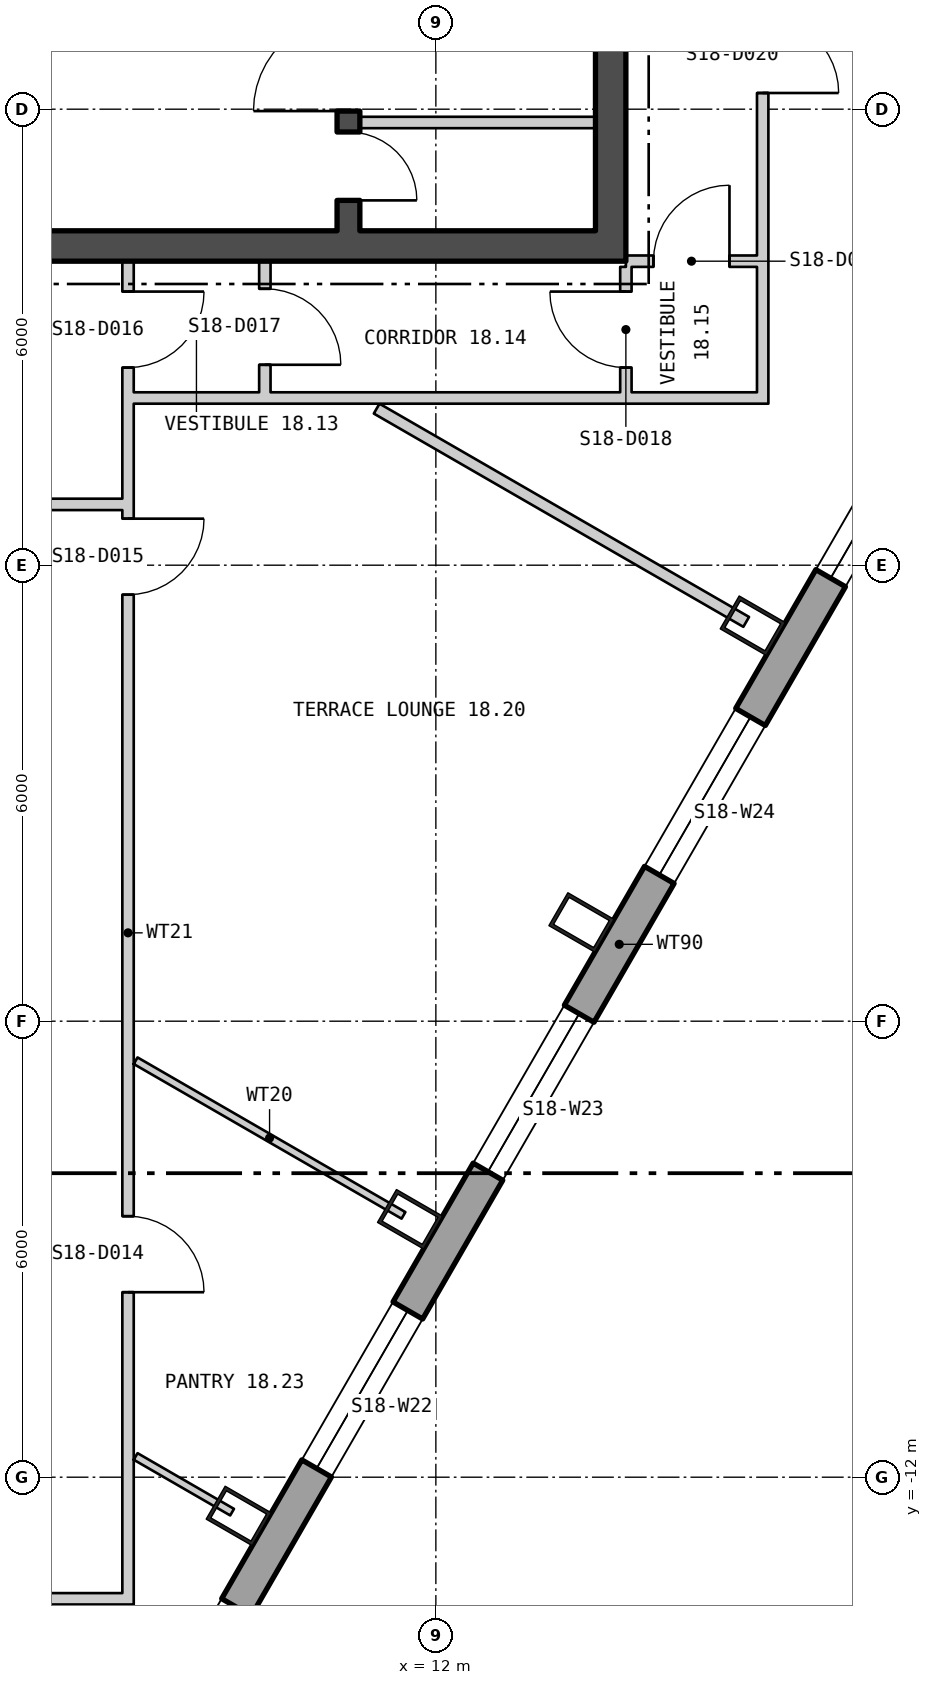
"""IFC4 building model, lengths in metres.
Left out: names, types, materials, properties, quantities, classifications, styles, units other than length and angle.
Written with IfcOpenShell. Run it as: python <this file> out.ifc"""

import sys

from ifc_helpers import new_model, si_unit, direction, frame, frame_2d, origin, origin_2d, place, context, subcontext, project, spatial, polyline, rectangle, hollow_rectangle, outline, extrude, element, fill, save


model = new_model("IFC4")
c1 = context("Model", 3, precision=1e-05, world=origin(), true_north=direction((0.0, 1.0)))
c2 = subcontext(c1, "Body", "Model", "MODEL_VIEW")
j1 = project(units=[si_unit("LENGTHUNIT", "METRE"), si_unit("PLANEANGLEUNIT", "RADIAN")], contexts=[c1])
p1 = place(None, origin())
s1 = spatial("IfcSite", under=j1, at=p1, CompositionType="ELEMENT")
p2 = place(p1, origin())
s2 = spatial("IfcBuilding", under=s1, at=p2, CompositionType="ELEMENT")
p3 = place(p2, frame((0.0, 0.0, 245.4)))
s3 = spatial("IfcBuildingStorey", under=s2, at=p3, CompositionType="ELEMENT", Elevation=245.4)
for number, where, z_axis, x_axis in (
    (1, (9.406, -12.51, 0.0), (0.0, 0.0, 1.0), (0.5, 0.866, 0.0)),
    (2, (11.66, -8.606, 0.0), (0.0, 0.0, 1.0), (0.5, 0.866, 0.0)),
    (3, (13.915, -4.701, 0.0), (0.0, 0.0, 1.0), (0.5, 0.866, 0.0)),
    (4, (16.169, -0.796, 0.0), (0.0, 0.0, 1.0), (0.5, 0.866, 0.0)),
):
    element("IfcColumn", number, at=place(p3, frame(where, z_axis=z_axis, x_axis=x_axis)), inside=s3, PredefinedType="COLUMN", context=c2, shape_type="SweptSolid", body=[
        extrude(hollow_rectangle(XDim=0.5, YDim=0.7, WallThickness=0.045, at=origin_2d()), origin(), (0.0, 0.0, 1.0), 3.9),
    ])
p4 = place(p3, frame((2.975, -24.799, -0.18), z_axis=(0.0, 0.0, 1.0), x_axis=(0.500000335318, 0.866025210188, 0.0)))
e5 = element("IfcWall", 5, at=p4, inside=s3, PredefinedType="SOLIDWALL", context=c2, shape_type="SweptSolid", body=[
    extrude(outline(polyline([(-0.13, -0.225), (45.88, -0.225), (45.62, 0.225), (0.13, 0.225), (-0.13, -0.225)])), origin(), (0.0, 0.0, 1.0), 3.68),
])
p5 = place(p4, frame((1.425, 0.0, 1.08)))
e6 = element("IfcOpeningElement", 6, at=p5, cuts=e5, PredefinedType="OPENING", context=c2, shape_type="SweptSolid", body=[
    extrude(rectangle(XDim=2.4, YDim=2.0, at=frame_2d((1.2, 1.0))), frame((0.0, 0.235, 0.0), z_axis=(0.0, -1.0, 0.0), x_axis=(1.0, 0.0, 0.0)), (0.0, 0.0, 1.0), 0.47),
])
p6 = place(p4, frame((5.895, 0.0, 1.08)))
e7 = element("IfcOpeningElement", 7, at=p6, cuts=e5, PredefinedType="OPENING", context=c2, shape_type="SweptSolid", body=[
    extrude(rectangle(XDim=2.4, YDim=2.0, at=frame_2d((1.2, 1.0))), frame((0.0, 0.235, 0.0), z_axis=(0.0, -1.0, 0.0), x_axis=(1.0, 0.0, 0.0)), (0.0, 0.0, 1.0), 0.47),
])
p7 = place(p4, frame((10.403, 0.0, 1.08)))
e8 = element("IfcOpeningElement", 8, at=p7, cuts=e5, PredefinedType="OPENING", context=c2, shape_type="SweptSolid", body=[
    extrude(rectangle(XDim=2.4, YDim=2.0, at=frame_2d((1.2, 1.0))), frame((0.0, 0.235, 0.0), z_axis=(0.0, -1.0, 0.0), x_axis=(1.0, 0.0, 0.0)), (0.0, 0.0, 1.0), 0.47),
])
p8 = place(p4, frame((14.912, 0.0, 1.08)))
e9 = element("IfcOpeningElement", 9, at=p8, cuts=e5, PredefinedType="OPENING", context=c2, shape_type="SweptSolid", body=[
    extrude(rectangle(XDim=2.4, YDim=2.0, at=frame_2d((1.2, 1.0))), frame((0.0, 0.235, 0.0), z_axis=(0.0, -1.0, 0.0), x_axis=(1.0, 0.0, 0.0)), (0.0, 0.0, 1.0), 0.47),
])
p9 = place(p4, frame((19.421, 0.0, 1.08)))
e10 = element("IfcOpeningElement", 10, at=p9, cuts=e5, PredefinedType="OPENING", context=c2, shape_type="SweptSolid", body=[
    extrude(rectangle(XDim=2.4, YDim=2.0, at=frame_2d((1.2, 1.0))), frame((0.0, 0.235, 0.0), z_axis=(0.0, -1.0, 0.0), x_axis=(1.0, 0.0, 0.0)), (0.0, 0.0, 1.0), 0.47),
])
p10 = place(p4, frame((23.929, 0.0, 1.08)))
e11 = element("IfcOpeningElement", 11, at=p10, cuts=e5, PredefinedType="OPENING", context=c2, shape_type="SweptSolid", body=[
    extrude(rectangle(XDim=2.4, YDim=2.0, at=frame_2d((1.2, 1.0))), frame((0.0, 0.235, 0.0), z_axis=(0.0, -1.0, 0.0), x_axis=(1.0, 0.0, 0.0)), (0.0, 0.0, 1.0), 0.47),
])
p11 = place(p4, frame((28.438, 0.0, 1.08)))
e12 = element("IfcOpeningElement", 12, at=p11, cuts=e5, PredefinedType="OPENING", context=c2, shape_type="SweptSolid", body=[
    extrude(rectangle(XDim=2.4, YDim=2.0, at=frame_2d((1.2, 1.0))), frame((0.0, 0.235, 0.0), z_axis=(0.0, -1.0, 0.0), x_axis=(1.0, 0.0, 0.0)), (0.0, 0.0, 1.0), 0.47),
])
p12 = place(p4, frame((32.947, 0.0, 1.08)))
e13 = element("IfcOpeningElement", 13, at=p12, cuts=e5, PredefinedType="OPENING", context=c2, shape_type="SweptSolid", body=[
    extrude(rectangle(XDim=2.4, YDim=2.0, at=frame_2d((1.2, 1.0))), frame((0.0, 0.235, 0.0), z_axis=(0.0, -1.0, 0.0), x_axis=(1.0, 0.0, 0.0)), (0.0, 0.0, 1.0), 0.47),
])
p13 = place(p4, frame((37.455, 0.0, 1.08)))
e14 = element("IfcOpeningElement", 14, at=p13, cuts=e5, PredefinedType="OPENING", context=c2, shape_type="SweptSolid", body=[
    extrude(rectangle(XDim=2.4, YDim=2.0, at=frame_2d((1.2, 1.0))), frame((0.0, 0.235, 0.0), z_axis=(0.0, -1.0, 0.0), x_axis=(1.0, 0.0, 0.0)), (0.0, 0.0, 1.0), 0.47),
])
p14 = place(p4, frame((41.925, 0.0, 1.08)))
e15 = element("IfcOpeningElement", 15, at=p14, cuts=e5, PredefinedType="OPENING", context=c2, shape_type="SweptSolid", body=[
    extrude(rectangle(XDim=2.4, YDim=2.0, at=frame_2d((1.2, 1.0))), frame((0.0, 0.235, 0.0), z_axis=(0.0, -1.0, 0.0), x_axis=(1.0, 0.0, 0.0)), (0.0, 0.0, 1.0), 0.47),
])
p15 = place(p3, frame((-14.5, 4.2, 0.0), z_axis=(0.0, 0.0, 1.0), x_axis=(1.0, 0.0, 0.0)))
e16 = element("IfcWall", 16, at=p15, inside=s3, PredefinedType="SHEAR", context=c2, shape_type="SweptSolid", body=[
    extrude(rectangle(XDim=29.0, YDim=0.4, at=frame_2d((14.5, 0.0))), origin(), (0.0, 0.0, 1.0), 3.7),
])
p16 = place(p15, frame((9.0, 0.0, 0.0)))
e17 = element("IfcOpeningElement", 17, at=p16, cuts=e16, PredefinedType="OPENING", context=c2, shape_type="SweptSolid", body=[
    extrude(rectangle(XDim=1.8, YDim=2.4, at=frame_2d((0.9, 1.2))), frame((0.0, 0.21, 0.0), z_axis=(0.0, -1.0, 0.0), x_axis=(1.0, 0.0, 0.0)), (0.0, 0.0, 1.0), 0.42),
])
p17 = place(p15, frame((19.0, 0.0, 0.0)))
e18 = element("IfcOpeningElement", 18, at=p17, cuts=e16, PredefinedType="OPENING", context=c2, shape_type="SweptSolid", body=[
    extrude(rectangle(XDim=1.8, YDim=2.4, at=frame_2d((0.9, 1.2))), frame((0.0, 0.21, 0.0), z_axis=(0.0, -1.0, 0.0), x_axis=(1.0, 0.0, 0.0)), (0.0, 0.0, 1.0), 0.42),
])
p18 = place(p3, frame((14.3, 4.4, 0.0), z_axis=(0.0, 0.0, 1.0), x_axis=(0.0, 1.0, 0.0)))
e19 = element("IfcWall", 19, at=p18, inside=s3, PredefinedType="SHEAR", context=c2, shape_type="SweptSolid", body=[
    extrude(rectangle(XDim=13.2, YDim=0.4, at=frame_2d((6.6, 0.0))), origin(), (0.0, 0.0, 1.0), 3.7),
])
p19 = place(p18, frame((3.05, 0.0, 0.0)))
e20 = element("IfcOpeningElement", 20, at=p19, cuts=e19, PredefinedType="OPENING", context=c2, shape_type="SweptSolid", body=[
    extrude(rectangle(XDim=1.5, YDim=2.1, at=frame_2d((0.75, 1.05))), frame((0.0, 0.21, 0.0), z_axis=(0.0, -1.0, 0.0), x_axis=(1.0, 0.0, 0.0)), (0.0, 0.0, 1.0), 0.42),
])
p20 = place(p3, frame((10.85, 4.4, 0.0), z_axis=(0.0, 0.0, 1.0), x_axis=(0.0, 1.0, 0.0)))
e21 = element("IfcWall", 21, at=p20, inside=s3, PredefinedType="SHEAR", context=c2, shape_type="SweptSolid", body=[
    extrude(rectangle(XDim=13.2, YDim=0.3, at=frame_2d((6.6, 0.0))), origin(), (0.0, 0.0, 1.0), 3.7),
])
p21 = place(p20, frame((1.575, 0.0, 0.0)))
e22 = element("IfcOpeningElement", 22, at=p21, cuts=e21, PredefinedType="OPENING", context=c2, shape_type="SweptSolid", body=[
    extrude(rectangle(XDim=1.25, YDim=2.1, at=frame_2d((0.625, 1.05))), frame((0.0, 0.16, 0.0), z_axis=(0.0, -1.0, 0.0), x_axis=(1.0, 0.0, 0.0)), (0.0, 0.0, 1.0), 0.32),
])
p22 = place(p20, frame((0.4, 0.0, 0.0)))
e23 = element("IfcOpeningElement", 23, at=p22, cuts=e21, PredefinedType="OPENING", context=c2, shape_type="SweptSolid", body=[
    extrude(rectangle(XDim=0.9, YDim=2.1, at=frame_2d((0.45, 1.05))), frame((0.0, 0.16, 0.0), z_axis=(0.0, -1.0, 0.0), x_axis=(1.0, 0.0, 0.0)), (0.0, 0.0, 1.0), 0.32),
])
p23 = place(p3, frame((11.0, 5.825, 0.0), z_axis=(0.0, 0.0, 1.0), x_axis=(1.0, 0.0, 0.0)))
e24 = element("IfcWall", 24, at=p23, inside=s3, PredefinedType="PARTITIONING", context=c2, shape_type="SweptSolid", body=[
    extrude(rectangle(XDim=3.1, YDim=0.15, at=frame_2d((1.55, 0.0))), origin(), (0.0, 0.0, 1.0), 3.7),
])
p24 = place(p3, frame((6.7, -13.6, 0.0), z_axis=(0.0, 0.0, 1.0), x_axis=(1.0, 0.0, 0.0)))
e25 = element("IfcWall", 25, at=p24, inside=s3, PredefinedType="PARTITIONING", context=c2, shape_type="SweptSolid", body=[
    extrude(rectangle(XDim=1.175, YDim=0.15, at=frame_2d((0.588, 0.0))), origin(), (0.0, 0.0, 1.0), 3.16),
])
p25 = place(p3, frame((4.538, 0.8, 0.0), z_axis=(0.0, 0.0, 1.0), x_axis=(1.0, 0.0, 0.0)))
e26 = element("IfcWall", 26, at=p25, inside=s3, PredefinedType="PARTITIONING", context=c2, shape_type="SweptSolid", body=[
    extrude(rectangle(XDim=3.337, YDim=0.15, at=frame_2d((1.669, 0.0))), origin(), (0.0, 0.0, 1.0), 3.7),
])
p26 = place(p25, frame((1.168, 0.0, 0.0)))
e27 = element("IfcOpeningElement", 27, at=p26, cuts=e26, PredefinedType="OPENING", context=c2, shape_type="SweptSolid", body=[
    extrude(rectangle(XDim=1.0, YDim=2.1, at=frame_2d((0.5, 1.05))), frame((0.0, 0.085, 0.0), z_axis=(0.0, -1.0, 0.0), x_axis=(1.0, 0.0, 0.0)), (0.0, 0.0, 1.0), 0.17),
])
p27 = place(p3, frame((7.95, -13.675, 0.0), z_axis=(0.0, 0.0, 1.0), x_axis=(0.0, 1.0, 0.0)))
e28 = element("IfcWall", 28, at=p27, inside=s3, PredefinedType="PARTITIONING", context=c2, shape_type="SweptSolid", body=[
    extrude(rectangle(XDim=17.675, YDim=0.15, at=frame_2d((8.838, 0.0))), origin(), (0.0, 0.0, 1.0), 3.7),
])
p28 = place(p27, frame((4.109, 0.0, 0.0)))
e29 = element("IfcOpeningElement", 29, at=p28, cuts=e28, PredefinedType="OPENING", context=c2, shape_type="SweptSolid", body=[
    extrude(rectangle(XDim=1.0, YDim=2.1, at=frame_2d((0.5, 1.05))), frame((0.0, 0.085, 0.0), z_axis=(0.0, -1.0, 0.0), x_axis=(1.0, 0.0, 0.0)), (0.0, 0.0, 1.0), 0.17),
])
p29 = place(p27, frame((13.287, 0.0, 0.0)))
e30 = element("IfcOpeningElement", 30, at=p29, cuts=e28, PredefinedType="OPENING", context=c2, shape_type="SweptSolid", body=[
    extrude(rectangle(XDim=1.0, YDim=2.1, at=frame_2d((0.5, 1.05))), frame((0.0, 0.085, 0.0), z_axis=(0.0, -1.0, 0.0), x_axis=(1.0, 0.0, 0.0)), (0.0, 0.0, 1.0), 0.17),
])
p30 = place(p27, frame((16.275, 0.0, 0.0)))
e31 = element("IfcOpeningElement", 31, at=p30, cuts=e28, PredefinedType="OPENING", context=c2, shape_type="SweptSolid", body=[
    extrude(rectangle(XDim=1.0, YDim=2.1, at=frame_2d((0.5, 1.05))), frame((0.0, 0.085, 0.0), z_axis=(0.0, -1.0, 0.0), x_axis=(1.0, 0.0, 0.0)), (0.0, 0.0, 1.0), 0.17),
])
p31 = place(p3, frame((8.025, 2.2, 0.0), z_axis=(0.0, 0.0, 1.0), x_axis=(1.0, 0.0, 0.0)))
e32 = element("IfcWall", 32, at=p31, inside=s3, PredefinedType="PARTITIONING", context=c2, shape_type="SweptSolid", body=[
    extrude(rectangle(XDim=8.2, YDim=0.15, at=frame_2d((4.1, 0.0))), origin(), (0.0, 0.0, 1.0), 3.7),
])
p32 = place(p3, frame((8.05, -6.52, 0.0), z_axis=(0.0, 0.0, 1.0), x_axis=(0.865980959039, -0.500076972657, 0.0)))
e33 = element("IfcWall", 33, at=p32, inside=s3, PredefinedType="PARTITIONING", context=c2, shape_type="SweptSolid", body=[
    extrude(rectangle(XDim=4.069, YDim=0.1, at=frame_2d((2.035, 0.0))), origin(), (0.0, 0.0, 1.0), 3.7),
])
p33 = place(p3, frame((8.05, -11.727, 0.0), z_axis=(0.0, 0.0, 1.0), x_axis=(0.865924183809, -0.500175277173, 0.0)))
e34 = element("IfcWall", 34, at=p33, inside=s3, PredefinedType="PARTITIONING", context=c2, shape_type="SweptSolid", body=[
    extrude(rectangle(XDim=1.466, YDim=0.1, at=frame_2d((0.733, 0.0))), origin(), (0.0, 0.0, 1.0), 3.7),
])
p34 = place(p3, frame((9.75, 2.275, 0.0), z_axis=(0.0, 0.0, 1.0), x_axis=(0.0, 1.0, 0.0)))
e35 = element("IfcWall", 35, at=p34, inside=s3, PredefinedType="PARTITIONING", context=c2, shape_type="SweptSolid", body=[
    extrude(rectangle(XDim=1.725, YDim=0.15, at=frame_2d((0.863, 0.0))), origin(), (0.0, 0.0, 1.0), 3.7),
])
p35 = place(p34, frame((0.362, 0.0, 0.0)))
e36 = element("IfcOpeningElement", 36, at=p35, cuts=e35, PredefinedType="OPENING", context=c2, shape_type="SweptSolid", body=[
    extrude(rectangle(XDim=1.0, YDim=2.1, at=frame_2d((0.5, 1.05))), frame((0.0, 0.085, 0.0), z_axis=(0.0, -1.0, 0.0), x_axis=(1.0, 0.0, 0.0)), (0.0, 0.0, 1.0), 0.17),
])
p36 = place(p3, frame((11.221, 2.06, 0.0), z_axis=(0.0, 0.0, 1.0), x_axis=(0.866108468144, -0.499856100702, 0.0)))
e37 = element("IfcWall", 37, at=p36, inside=s3, PredefinedType="PARTITIONING", context=c2, shape_type="SweptSolid", body=[
    extrude(rectangle(XDim=5.614, YDim=0.15, at=frame_2d((2.807, 0.0))), origin(), (0.0, 0.0, 1.0), 3.7),
])
p37 = place(p3, frame((14.5, 2.275, 0.0), z_axis=(0.0, 0.0, 1.0), x_axis=(0.0, 1.0, 0.0)))
e38 = element("IfcWall", 38, at=p37, inside=s3, PredefinedType="PARTITIONING", context=c2, shape_type="SweptSolid", body=[
    extrude(rectangle(XDim=1.65, YDim=0.15, at=frame_2d((0.825, 0.0))), origin(), (0.0, 0.0, 1.0), 3.7),
])
p38 = place(p37, frame((0.325, 0.0, 0.0)))
e39 = element("IfcOpeningElement", 39, at=p38, cuts=e38, PredefinedType="OPENING", context=c2, shape_type="SweptSolid", body=[
    extrude(rectangle(XDim=1.0, YDim=2.1, at=frame_2d((0.5, 1.05))), frame((0.0, 0.085, 0.0), z_axis=(0.0, -1.0, 0.0), x_axis=(1.0, 0.0, 0.0)), (0.0, 0.0, 1.0), 0.17),
])
p39 = place(p3, frame((14.5, 4.0, 0.0), z_axis=(0.0, 0.0, 1.0), x_axis=(1.0, 0.0, 0.0)))
e40 = element("IfcWall", 40, at=p39, inside=s3, PredefinedType="PARTITIONING", context=c2, shape_type="SweptSolid", body=[
    extrude(rectangle(XDim=1.725, YDim=0.15, at=frame_2d((0.863, 0.0))), origin(), (0.0, 0.0, 1.0), 3.16),
])
p40 = place(p39, frame((0.363, 0.0, 0.0)))
e41 = element("IfcOpeningElement", 41, at=p40, cuts=e40, PredefinedType="OPENING", context=c2, shape_type="SweptSolid", body=[
    extrude(rectangle(XDim=1.0, YDim=2.1, at=frame_2d((0.5, 1.05))), frame((0.0, 0.085, 0.0), z_axis=(0.0, -1.0, 0.0), x_axis=(1.0, 0.0, 0.0)), (0.0, 0.0, 1.0), 0.17),
])
p41 = place(p3, frame((16.3, 2.125, 0.0), z_axis=(0.0, 0.0, 1.0), x_axis=(0.0, 1.0, 0.0)))
e42 = element("IfcWall", 42, at=p41, inside=s3, PredefinedType="PARTITIONING", context=c2, shape_type="SweptSolid", body=[
    extrude(rectangle(XDim=17.622, YDim=0.15, at=frame_2d((8.811, 0.0))), origin(), (0.0, 0.0, 1.0), 3.7),
])
p42 = place(p41, frame((4.088, 0.0, 0.0)))
e43 = element("IfcOpeningElement", 43, at=p42, cuts=e42, PredefinedType="OPENING", context=c2, shape_type="SweptSolid", body=[
    extrude(rectangle(XDim=1.0, YDim=2.1, at=frame_2d((0.5, 1.05))), frame((0.0, 0.085, 0.0), z_axis=(0.0, -1.0, 0.0), x_axis=(1.0, 0.0, 0.0)), (0.0, 0.0, 1.0), 0.17),
])
p43 = place(p41, frame((8.517, 0.0, 0.0)))
e44 = element("IfcOpeningElement", 44, at=p43, cuts=e42, PredefinedType="OPENING", context=c2, shape_type="SweptSolid", body=[
    extrude(rectangle(XDim=1.0, YDim=2.1, at=frame_2d((0.5, 1.05))), frame((0.0, 0.085, 0.0), z_axis=(0.0, -1.0, 0.0), x_axis=(1.0, 0.0, 0.0)), (0.0, 0.0, 1.0), 0.17),
])
p44 = place(p41, frame((13.496, 0.0, 0.0)))
e45 = element("IfcOpeningElement", 45, at=p44, cuts=e42, PredefinedType="OPENING", context=c2, shape_type="SweptSolid", body=[
    extrude(rectangle(XDim=1.0, YDim=2.1, at=frame_2d((0.5, 1.05))), frame((0.0, 0.085, 0.0), z_axis=(0.0, -1.0, 0.0), x_axis=(1.0, 0.0, 0.0)), (0.0, 0.0, 1.0), 0.17),
])
p45 = place(p7, origin())
e46 = element("IfcWindow", 46, at=p45, inside=s3, PartitioningType="SINGLE_PANEL", PredefinedType="WINDOW", context=c2, shape_type="SweptSolid", body=[
    extrude(rectangle(XDim=2.4, YDim=2.0, at=frame_2d((1.2, 1.0))), frame((0.0, 0.105, 0.0), z_axis=(0.0, -1.0, 0.0), x_axis=(1.0, 0.0, 0.0)), (0.0, 0.0, 1.0), 0.06),
])
fill(e8, e46)
p46 = place(p8, origin())
e47 = element("IfcWindow", 47, at=p46, inside=s3, PartitioningType="SINGLE_PANEL", PredefinedType="WINDOW", context=c2, shape_type="SweptSolid", body=[
    extrude(rectangle(XDim=2.4, YDim=2.0, at=frame_2d((1.2, 1.0))), frame((0.0, 0.105, 0.0), z_axis=(0.0, -1.0, 0.0), x_axis=(1.0, 0.0, 0.0)), (0.0, 0.0, 1.0), 0.06),
])
fill(e9, e47)
p47 = place(p9, origin())
e48 = element("IfcWindow", 48, at=p47, inside=s3, PartitioningType="SINGLE_PANEL", PredefinedType="WINDOW", context=c2, shape_type="SweptSolid", body=[
    extrude(rectangle(XDim=2.4, YDim=2.0, at=frame_2d((1.2, 1.0))), frame((0.0, 0.105, 0.0), z_axis=(0.0, -1.0, 0.0), x_axis=(1.0, 0.0, 0.0)), (0.0, 0.0, 1.0), 0.06),
])
fill(e10, e48)
p48 = place(p10, origin())
e49 = element("IfcWindow", 49, at=p48, inside=s3, PartitioningType="SINGLE_PANEL", PredefinedType="WINDOW", context=c2, shape_type="SweptSolid", body=[
    extrude(rectangle(XDim=2.4, YDim=2.0, at=frame_2d((1.2, 1.0))), frame((0.0, 0.105, 0.0), z_axis=(0.0, -1.0, 0.0), x_axis=(1.0, 0.0, 0.0)), (0.0, 0.0, 1.0), 0.06),
])
fill(e11, e49)
p49 = place(p11, origin())
e50 = element("IfcWindow", 50, at=p49, inside=s3, PartitioningType="SINGLE_PANEL", PredefinedType="WINDOW", context=c2, shape_type="SweptSolid", body=[
    extrude(rectangle(XDim=2.4, YDim=2.0, at=frame_2d((1.2, 1.0))), frame((0.0, 0.105, 0.0), z_axis=(0.0, -1.0, 0.0), x_axis=(1.0, 0.0, 0.0)), (0.0, 0.0, 1.0), 0.06),
])
fill(e12, e50)
p50 = place(p21, origin())
e51 = element("IfcDoor", 51, at=p50, inside=s3, OperationType="SINGLE_SWING_RIGHT", PredefinedType="DOOR", context=c2, shape_type="SweptSolid", body=[
    extrude(rectangle(XDim=1.25, YDim=2.1, at=frame_2d((0.625, 1.05))), frame((0.0, 0.025, 0.0), z_axis=(0.0, -1.0, 0.0), x_axis=(1.0, 0.0, 0.0)), (0.0, 0.0, 1.0), 0.05),
])
fill(e22, e51)
p51 = place(p22, origin())
e52 = element("IfcDoor", 52, at=p51, inside=s3, OperationType="SINGLE_SWING_LEFT", PredefinedType="DOOR", context=c2, shape_type="SweptSolid", body=[
    extrude(rectangle(XDim=0.9, YDim=2.1, at=frame_2d((0.45, 1.05))), frame((0.0, 0.025, 0.0), z_axis=(0.0, -1.0, 0.0), x_axis=(1.0, 0.0, 0.0)), (0.0, 0.0, 1.0), 0.05),
])
fill(e23, e52)
p52 = place(p28, origin())
e53 = element("IfcDoor", 53, at=p52, inside=s3, OperationType="SINGLE_SWING_LEFT", PredefinedType="DOOR", context=c2, shape_type="SweptSolid", body=[
    extrude(rectangle(XDim=1.0, YDim=2.1, at=frame_2d((0.5, 1.05))), frame((0.0, 0.025, 0.0), z_axis=(0.0, -1.0, 0.0), x_axis=(1.0, 0.0, 0.0)), (0.0, 0.0, 1.0), 0.05),
])
fill(e29, e53)
p53 = place(p29, origin())
e54 = element("IfcDoor", 54, at=p53, inside=s3, OperationType="SINGLE_SWING_RIGHT", PredefinedType="DOOR", context=c2, shape_type="SweptSolid", body=[
    extrude(rectangle(XDim=1.0, YDim=2.1, at=frame_2d((0.5, 1.05))), frame((0.0, 0.025, 0.0), z_axis=(0.0, -1.0, 0.0), x_axis=(1.0, 0.0, 0.0)), (0.0, 0.0, 1.0), 0.05),
])
fill(e30, e54)
p54 = place(p30, origin())
e55 = element("IfcDoor", 55, at=p54, inside=s3, OperationType="SINGLE_SWING_RIGHT", PredefinedType="DOOR", context=c2, shape_type="SweptSolid", body=[
    extrude(rectangle(XDim=1.0, YDim=2.1, at=frame_2d((0.5, 1.05))), frame((0.0, 0.025, 0.0), z_axis=(0.0, -1.0, 0.0), x_axis=(1.0, 0.0, 0.0)), (0.0, 0.0, 1.0), 0.05),
])
fill(e31, e55)
p55 = place(p35, origin())
e56 = element("IfcDoor", 56, at=p55, inside=s3, OperationType="SINGLE_SWING_LEFT", PredefinedType="DOOR", context=c2, shape_type="SweptSolid", body=[
    extrude(rectangle(XDim=1.0, YDim=2.1, at=frame_2d((0.5, 1.05))), frame((0.0, 0.025, 0.0), z_axis=(0.0, -1.0, 0.0), x_axis=(1.0, 0.0, 0.0)), (0.0, 0.0, 1.0), 0.05),
])
fill(e36, e56)
p56 = place(p38, origin())
e57 = element("IfcDoor", 57, at=p56, inside=s3, OperationType="SINGLE_SWING_LEFT", PredefinedType="DOOR", context=c2, shape_type="SweptSolid", body=[
    extrude(rectangle(XDim=1.0, YDim=2.1, at=frame_2d((0.5, 1.05))), frame((0.0, 0.025, 0.0), z_axis=(0.0, -1.0, 0.0), x_axis=(1.0, 0.0, 0.0)), (0.0, 0.0, 1.0), 0.05),
])
fill(e39, e57)
p57 = place(p40, origin())
e58 = element("IfcDoor", 58, at=p57, inside=s3, OperationType="SINGLE_SWING_LEFT", PredefinedType="DOOR", context=c2, shape_type="SweptSolid", body=[
    extrude(rectangle(XDim=1.0, YDim=2.1, at=frame_2d((0.5, 1.05))), frame((0.0, 0.025, 0.0), z_axis=(0.0, -1.0, 0.0), x_axis=(1.0, 0.0, 0.0)), (0.0, 0.0, 1.0), 0.05),
])
fill(e41, e58)
p58 = place(p42, origin())
e59 = element("IfcDoor", 59, at=p58, inside=s3, OperationType="SINGLE_SWING_LEFT", PredefinedType="DOOR", context=c2, shape_type="SweptSolid", body=[
    extrude(rectangle(XDim=1.0, YDim=2.1, at=frame_2d((0.5, 1.05))), frame((0.0, 0.025, 0.0), z_axis=(0.0, -1.0, 0.0), x_axis=(1.0, 0.0, 0.0)), (0.0, 0.0, 1.0), 0.05),
])
fill(e43, e59)
save(model, sys.argv[1])
